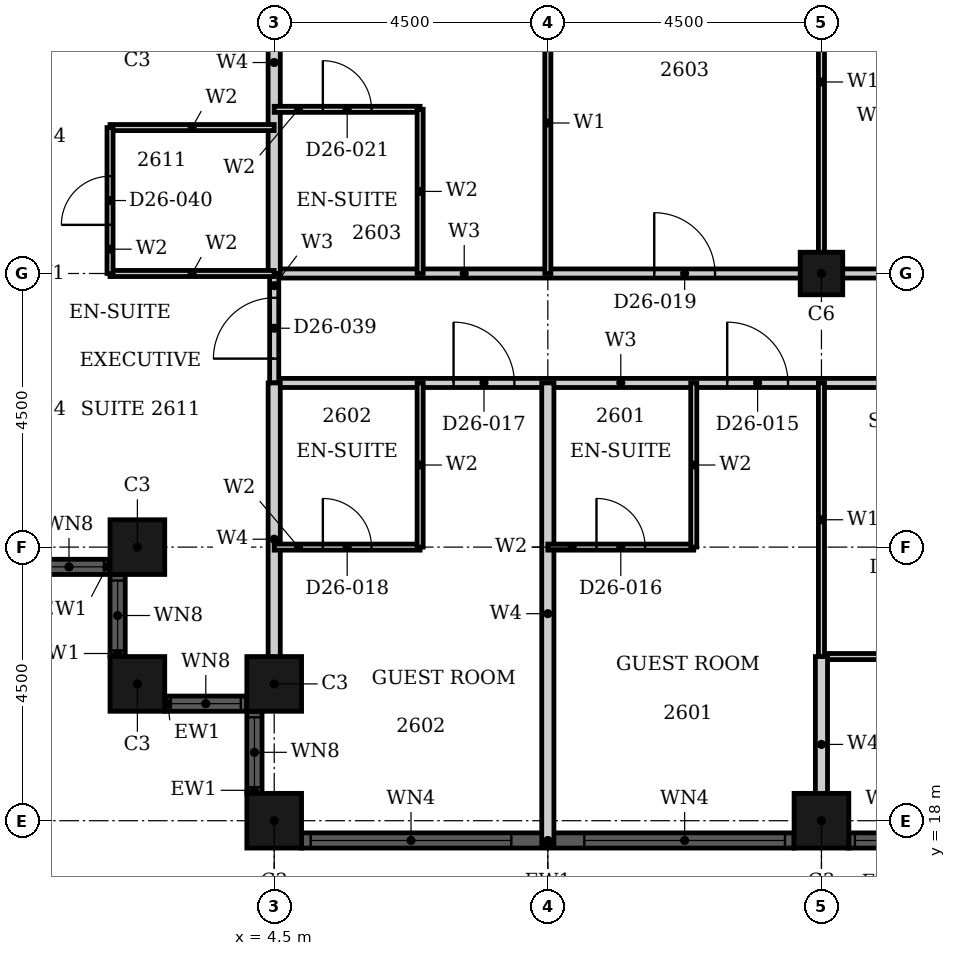
"""IFC4 building model, lengths in metres.
Left out: names, types, materials, properties, quantities, classifications, styles, units other than length and angle.
Written with IfcOpenShell. Run it as: python <this file> out.ifc"""

import sys

from ifc_helpers import new_model, si_unit, direction, frame, frame_2d, origin, origin_2d, place, context, subcontext, project, spatial, rectangle, hollow_rectangle, extrude, element, fill, save


model = new_model("IFC4")
c1 = context("Model", 3, precision=1e-05, world=origin(), true_north=direction((0.0, 1.0)))
c2 = subcontext(c1, "Body", "Model", "MODEL_VIEW")
j1 = project(units=[si_unit("LENGTHUNIT", "METRE"), si_unit("PLANEANGLEUNIT", "RADIAN")], contexts=[c1])
p1 = place(None, origin())
s1 = spatial("IfcSite", under=j1, at=p1, CompositionType="ELEMENT")
p2 = place(p1, origin())
s2 = spatial("IfcBuilding", under=s1, at=p2, CompositionType="ELEMENT")
p3 = place(p2, frame((0.0, 0.0, 108.0)))
s3 = spatial("IfcBuildingStorey", under=s2, at=p3, CompositionType="ELEMENT", Elevation=108.0)
for number, where, z_axis, x_axis in (
    (1, (2.25, 22.5, 0.0), (0.0, 0.0, 1.0), (1.0, 0.0, 0.0)),
    (2, (2.25, 20.25, 0.0), (0.0, 0.0, 1.0), (1.0, 0.0, 0.0)),
    (3, (4.5, 20.25, 0.0), (0.0, 0.0, 1.0), (1.0, 0.0, 0.0)),
    (4, (4.5, 18.0, 0.0), (0.0, 0.0, 1.0), (1.0, 0.0, 0.0)),
    (5, (13.5, 18.0, 0.0), (0.0, 0.0, 1.0), (1.0, 0.0, 0.0)),
):
    element("IfcColumn", number, at=place(p3, frame(where, z_axis=z_axis, x_axis=x_axis)), inside=s3, PredefinedType="COLUMN", context=c2, shape_type="SweptSolid", body=[
        extrude(hollow_rectangle(XDim=0.9, YDim=0.9, WallThickness=0.028, at=origin_2d()), origin(), (0.0, 0.0, 1.0), 3.6),
    ])
p4 = place(p3, frame((13.5, 27.0, 0.0), z_axis=(0.0, 0.0, 1.0), x_axis=(1.0, 0.0, 0.0)))
e6 = element("IfcColumn", 6, at=p4, inside=s3, PredefinedType="COLUMN", context=c2, shape_type="SweptSolid", body=[
    extrude(hollow_rectangle(XDim=0.7, YDim=0.7, WallThickness=0.022, at=origin_2d()), origin(), (0.0, 0.0, 1.0), 3.6),
])
p5 = place(p3, frame((0.45, 22.175, 0.0), z_axis=(0.0, 0.0, 1.0), x_axis=(1.0, 0.0, 0.0)))
e7 = element("IfcWall", 7, at=p5, inside=s3, PredefinedType="SOLIDWALL", context=c2, shape_type="SweptSolid", body=[
    extrude(rectangle(XDim=1.35, YDim=0.25, at=frame_2d((0.675, 0.0))), origin(), (0.0, 0.0, 1.0), 3.6),
])
p6 = place(p5, frame((0.1, 0.0, 0.9)))
e8 = element("IfcOpeningElement", 8, at=p6, cuts=e7, PredefinedType="OPENING", context=c2, shape_type="SweptSolid", body=[
    extrude(rectangle(XDim=1.15, YDim=2.08, at=frame_2d((0.575, 1.04))), frame((0.0, 0.135, 0.0), z_axis=(0.0, -1.0, 0.0), x_axis=(1.0, 0.0, 0.0)), (0.0, 0.0, 1.0), 0.27),
])
p7 = place(p3, frame((1.925, 22.05, 0.0), z_axis=(0.0, 0.0, 1.0), x_axis=(0.0, -1.0, 0.0)))
e9 = element("IfcWall", 9, at=p7, inside=s3, PredefinedType="SOLIDWALL", context=c2, shape_type="SweptSolid", body=[
    extrude(rectangle(XDim=1.35, YDim=0.25, at=frame_2d((0.675, 0.0))), origin(), (0.0, 0.0, 1.0), 3.6),
])
p8 = place(p7, frame((0.1, 0.0, 0.9)))
e10 = element("IfcOpeningElement", 10, at=p8, cuts=e9, PredefinedType="OPENING", context=c2, shape_type="SweptSolid", body=[
    extrude(rectangle(XDim=1.15, YDim=2.08, at=frame_2d((0.575, 1.04))), frame((0.0, 0.135, 0.0), z_axis=(0.0, -1.0, 0.0), x_axis=(1.0, 0.0, 0.0)), (0.0, 0.0, 1.0), 0.27),
])
p9 = place(p3, frame((2.7, 19.925, 0.0), z_axis=(0.0, 0.0, 1.0), x_axis=(1.0, 0.0, 0.0)))
e11 = element("IfcWall", 11, at=p9, inside=s3, PredefinedType="SOLIDWALL", context=c2, shape_type="SweptSolid", body=[
    extrude(rectangle(XDim=1.35, YDim=0.25, at=frame_2d((0.675, 0.0))), origin(), (0.0, 0.0, 1.0), 3.6),
])
p10 = place(p9, frame((0.1, 0.0, 0.9)))
e12 = element("IfcOpeningElement", 12, at=p10, cuts=e11, PredefinedType="OPENING", context=c2, shape_type="SweptSolid", body=[
    extrude(rectangle(XDim=1.15, YDim=2.08, at=frame_2d((0.575, 1.04))), frame((0.0, 0.135, 0.0), z_axis=(0.0, -1.0, 0.0), x_axis=(1.0, 0.0, 0.0)), (0.0, 0.0, 1.0), 0.27),
])
p11 = place(p3, frame((4.175, 19.8, 0.0), z_axis=(0.0, 0.0, 1.0), x_axis=(0.0, -1.0, 0.0)))
e13 = element("IfcWall", 13, at=p11, inside=s3, PredefinedType="SOLIDWALL", context=c2, shape_type="SweptSolid", body=[
    extrude(rectangle(XDim=1.35, YDim=0.25, at=frame_2d((0.675, 0.0))), origin(), (0.0, 0.0, 1.0), 3.6),
])
p12 = place(p11, frame((0.1, 0.0, 0.9)))
e14 = element("IfcOpeningElement", 14, at=p12, cuts=e13, PredefinedType="OPENING", context=c2, shape_type="SweptSolid", body=[
    extrude(rectangle(XDim=1.15, YDim=2.08, at=frame_2d((0.575, 1.04))), frame((0.0, 0.135, 0.0), z_axis=(0.0, -1.0, 0.0), x_axis=(1.0, 0.0, 0.0)), (0.0, 0.0, 1.0), 0.27),
])
p13 = place(p3, frame((4.95, 17.675, 0.0), z_axis=(0.0, 0.0, 1.0), x_axis=(1.0, 0.0, 0.0)))
e15 = element("IfcWall", 15, at=p13, inside=s3, PredefinedType="SOLIDWALL", context=c2, shape_type="SweptSolid", body=[
    extrude(rectangle(XDim=8.1, YDim=0.25, at=frame_2d((4.05, 0.0))), origin(), (0.0, 0.0, 1.0), 3.6),
])
p14 = place(p13, frame((0.15, 0.0, 0.9)))
e16 = element("IfcOpeningElement", 16, at=p14, cuts=e15, PredefinedType="OPENING", context=c2, shape_type="SweptSolid", body=[
    extrude(rectangle(XDim=3.3, YDim=2.08, at=frame_2d((1.65, 1.04))), frame((0.0, 0.135, 0.0), z_axis=(0.0, -1.0, 0.0), x_axis=(1.0, 0.0, 0.0)), (0.0, 0.0, 1.0), 0.27),
])
p15 = place(p13, frame((4.65, 0.0, 0.9)))
e17 = element("IfcOpeningElement", 17, at=p15, cuts=e15, PredefinedType="OPENING", context=c2, shape_type="SweptSolid", body=[
    extrude(rectangle(XDim=3.3, YDim=2.08, at=frame_2d((1.65, 1.04))), frame((0.0, 0.135, 0.0), z_axis=(0.0, -1.0, 0.0), x_axis=(1.0, 0.0, 0.0)), (0.0, 0.0, 1.0), 0.27),
])
p16 = place(p3, frame((13.95, 17.675, 0.0), z_axis=(0.0, 0.0, 1.0), x_axis=(1.0, 0.0, 0.0)))
e18 = element("IfcWall", 18, at=p16, inside=s3, PredefinedType="SOLIDWALL", context=c2, shape_type="SweptSolid", body=[
    extrude(rectangle(XDim=1.35, YDim=0.25, at=frame_2d((0.675, 0.0))), origin(), (0.0, 0.0, 1.0), 3.6),
])
p17 = place(p16, frame((0.1, 0.0, 0.9)))
e19 = element("IfcOpeningElement", 19, at=p17, cuts=e18, PredefinedType="OPENING", context=c2, shape_type="SweptSolid", body=[
    extrude(rectangle(XDim=1.15, YDim=2.08, at=frame_2d((0.575, 1.04))), frame((0.0, 0.135, 0.0), z_axis=(0.0, -1.0, 0.0), x_axis=(1.0, 0.0, 0.0)), (0.0, 0.0, 1.0), 0.27),
])
p18 = place(p3, frame((4.5, 25.2, 0.0), z_axis=(0.0, 0.0, 1.0), x_axis=(1.0, 0.0, 0.0)))
e20 = element("IfcWall", 20, at=p18, inside=s3, PredefinedType="PARTITIONING", context=c2, shape_type="SweptSolid", body=[
    extrude(rectangle(XDim=11.7, YDim=0.15, at=frame_2d((5.85, 0.0))), origin(), (0.0, 0.0, 1.0), 3.3),
])
p19 = place(p18, frame((7.45, 0.0, 0.0)))
e21 = element("IfcOpeningElement", 21, at=p19, cuts=e20, PredefinedType="OPENING", context=c2, shape_type="SweptSolid", body=[
    extrude(rectangle(XDim=1.0, YDim=2.1, at=frame_2d((0.5, 1.05))), frame((0.0, 0.085, 0.0), z_axis=(0.0, -1.0, 0.0), x_axis=(1.0, 0.0, 0.0)), (0.0, 0.0, 1.0), 0.17),
])
p20 = place(p18, frame((2.95, 0.0, 0.0)))
e22 = element("IfcOpeningElement", 22, at=p20, cuts=e20, PredefinedType="OPENING", context=c2, shape_type="SweptSolid", body=[
    extrude(rectangle(XDim=1.0, YDim=2.1, at=frame_2d((0.5, 1.05))), frame((0.0, 0.085, 0.0), z_axis=(0.0, -1.0, 0.0), x_axis=(1.0, 0.0, 0.0)), (0.0, 0.0, 1.0), 0.17),
])
p21 = place(p3, frame((4.5, 27.0, 0.0), z_axis=(0.0, 0.0, 1.0), x_axis=(1.0, 0.0, 0.0)))
e23 = element("IfcWall", 23, at=p21, inside=s3, PredefinedType="PARTITIONING", context=c2, shape_type="SweptSolid", body=[
    extrude(rectangle(XDim=11.7, YDim=0.15, at=frame_2d((5.85, 0.0))), origin(), (0.0, 0.0, 1.0), 2.58),
])
p22 = place(p21, frame((6.25, 0.0, 0.0)))
e24 = element("IfcOpeningElement", 24, at=p22, cuts=e23, PredefinedType="OPENING", context=c2, shape_type="SweptSolid", body=[
    extrude(rectangle(XDim=1.0, YDim=2.1, at=frame_2d((0.5, 1.05))), frame((0.0, 0.085, 0.0), z_axis=(0.0, -1.0, 0.0), x_axis=(1.0, 0.0, 0.0)), (0.0, 0.0, 1.0), 0.17),
])
p23 = place(p3, frame((4.5, 25.2, 0.0), z_axis=(0.0, 0.0, 1.0), x_axis=(0.0, 1.0, 0.0)))
e25 = element("IfcWall", 25, at=p23, inside=s3, PredefinedType="PARTITIONING", context=c2, shape_type="SweptSolid", body=[
    extrude(rectangle(XDim=1.8, YDim=0.15, at=frame_2d((0.9, 0.0))), origin(), (0.0, 0.0, 1.0), 3.3),
])
p24 = place(p23, frame((0.4, 0.0, 0.0)))
e26 = element("IfcOpeningElement", 26, at=p24, cuts=e25, PredefinedType="OPENING", context=c2, shape_type="SweptSolid", body=[
    extrude(rectangle(XDim=1.0, YDim=2.1, at=frame_2d((0.5, 1.05))), frame((0.0, 0.085, 0.0), z_axis=(0.0, -1.0, 0.0), x_axis=(1.0, 0.0, 0.0)), (0.0, 0.0, 1.0), 0.17),
])
p25 = place(p3, frame((13.5, 20.7, 0.0), z_axis=(0.0, 0.0, 1.0), x_axis=(1.0, 0.0, 0.0)))
e27 = element("IfcWall", 27, at=p25, inside=s3, PredefinedType="PARTITIONING", context=c2, shape_type="SweptSolid", body=[
    extrude(rectangle(XDim=2.7, YDim=0.1, at=frame_2d((1.35, 0.0))), origin(), (0.0, 0.0, 1.0), 3.3),
])
p26 = place(p3, frame((13.5, 20.7, 0.0), z_axis=(0.0, 0.0, 1.0), x_axis=(0.0, 1.0, 0.0)))
e28 = element("IfcWall", 28, at=p26, inside=s3, PredefinedType="PARTITIONING", context=c2, shape_type="SweptSolid", body=[
    extrude(rectangle(XDim=4.5, YDim=0.1, at=frame_2d((2.25, 0.0))), origin(), (0.0, 0.0, 1.0), 2.38),
])
p27 = place(p3, frame((13.5, 27.0, 0.0), z_axis=(0.0, 0.0, 1.0), x_axis=(0.0, 1.0, 0.0)))
e29 = element("IfcWall", 29, at=p27, inside=s3, PredefinedType="PARTITIONING", context=c2, shape_type="SweptSolid", body=[
    extrude(rectangle(XDim=6.3, YDim=0.1, at=frame_2d((3.15, 0.0))), origin(), (0.0, 0.0, 1.0), 2.38),
])
p28 = place(p3, frame((9.0, 27.0, 0.0), z_axis=(0.0, 0.0, 1.0), x_axis=(0.0, 1.0, 0.0)))
e30 = element("IfcWall", 30, at=p28, inside=s3, PredefinedType="PARTITIONING", context=c2, shape_type="SweptSolid", body=[
    extrude(rectangle(XDim=9.39, YDim=0.1, at=frame_2d((4.695, 0.0))), origin(), (0.0, 0.0, 1.0), 3.3),
])
p29 = place(p28, frame((4.95, 0.0, 0.0)))
e31 = element("IfcOpeningElement", 31, at=p29, cuts=e30, PredefinedType="OPENING", context=c2, shape_type="SweptSolid", body=[
    extrude(rectangle(XDim=0.9, YDim=2.1, at=frame_2d((0.45, 1.05))), frame((0.0, 0.06, 0.0), z_axis=(0.0, -1.0, 0.0), x_axis=(1.0, 0.0, 0.0)), (0.0, 0.0, 1.0), 0.12),
])
p30 = place(p3, frame((13.5, 17.81, 0.0), z_axis=(0.0, 0.0, 1.0), x_axis=(0.0, 1.0, 0.0)))
e32 = element("IfcWall", 32, at=p30, inside=s3, PredefinedType="PARTITIONING", context=c2, shape_type="SweptSolid", body=[
    extrude(rectangle(XDim=2.89, YDim=0.2, at=frame_2d((1.445, 0.0))), origin(), (0.0, 0.0, 1.0), 2.38),
])
p31 = place(p3, frame((4.5, 20.06, 0.0), z_axis=(0.0, 0.0, 1.0), x_axis=(0.0, 1.0, 0.0)))
e33 = element("IfcWall", 33, at=p31, inside=s3, PredefinedType="PARTITIONING", context=c2, shape_type="SweptSolid", body=[
    extrude(rectangle(XDim=5.14, YDim=0.2, at=frame_2d((2.57, 0.0))), origin(), (0.0, 0.0, 1.0), 3.3),
])
p32 = place(p3, frame((4.5, 27.0, 0.0), z_axis=(0.0, 0.0, 1.0), x_axis=(0.0, 1.0, 0.0)))
e34 = element("IfcWall", 34, at=p32, inside=s3, PredefinedType="PARTITIONING", context=c2, shape_type="SweptSolid", body=[
    extrude(rectangle(XDim=6.94, YDim=0.2, at=frame_2d((3.47, 0.0))), origin(), (0.0, 0.0, 1.0), 3.3),
])
p33 = place(p3, frame((9.0, 17.61, 0.0), z_axis=(0.0, 0.0, 1.0), x_axis=(0.0, 1.0, 0.0)))
e35 = element("IfcWall", 35, at=p33, inside=s3, PredefinedType="PARTITIONING", context=c2, shape_type="SweptSolid", body=[
    extrude(rectangle(XDim=7.59, YDim=0.2, at=frame_2d((3.795, 0.0))), origin(), (0.0, 0.0, 1.0), 3.3),
])
p34 = place(p3, frame((9.0, 22.5, 0.0), z_axis=(0.0, 0.0, 1.0), x_axis=(1.0, 0.0, 0.0)))
e36 = element("IfcWall", 36, at=p34, inside=s3, PredefinedType="PARTITIONING", context=c2, shape_type="SweptSolid", body=[
    extrude(rectangle(XDim=2.4, YDim=0.1, at=frame_2d((1.2, 0.0))), origin(), (0.0, 0.0, 1.0), 2.58),
])
p35 = place(p34, frame((0.8, 0.0, 0.0)))
e37 = element("IfcOpeningElement", 37, at=p35, cuts=e36, PredefinedType="OPENING", context=c2, shape_type="SweptSolid", body=[
    extrude(rectangle(XDim=0.8, YDim=2.1, at=frame_2d((0.4, 1.05))), frame((0.0, 0.06, 0.0), z_axis=(0.0, -1.0, 0.0), x_axis=(1.0, 0.0, 0.0)), (0.0, 0.0, 1.0), 0.12),
])
p36 = place(p3, frame((4.5, 22.5, 0.0), z_axis=(0.0, 0.0, 1.0), x_axis=(1.0, 0.0, 0.0)))
e38 = element("IfcWall", 38, at=p36, inside=s3, PredefinedType="PARTITIONING", context=c2, shape_type="SweptSolid", body=[
    extrude(rectangle(XDim=2.4, YDim=0.1, at=frame_2d((1.2, 0.0))), origin(), (0.0, 0.0, 1.0), 2.58),
])
p37 = place(p36, frame((0.8, 0.0, 0.0)))
e39 = element("IfcOpeningElement", 39, at=p37, cuts=e38, PredefinedType="OPENING", context=c2, shape_type="SweptSolid", body=[
    extrude(rectangle(XDim=0.8, YDim=2.1, at=frame_2d((0.4, 1.05))), frame((0.0, 0.06, 0.0), z_axis=(0.0, -1.0, 0.0), x_axis=(1.0, 0.0, 0.0)), (0.0, 0.0, 1.0), 0.12),
])
p38 = place(p3, frame((1.8, 27.0, 0.0), z_axis=(0.0, 0.0, 1.0), x_axis=(1.0, 0.0, 0.0)))
e40 = element("IfcWall", 40, at=p38, inside=s3, PredefinedType="PARTITIONING", context=c2, shape_type="SweptSolid", body=[
    extrude(rectangle(XDim=2.7, YDim=0.1, at=frame_2d((1.35, 0.0))), origin(), (0.0, 0.0, 1.0), 2.58),
])
p39 = place(p3, frame((1.8, 29.4, 0.0), z_axis=(0.0, 0.0, 1.0), x_axis=(1.0, 0.0, 0.0)))
e41 = element("IfcWall", 41, at=p39, inside=s3, PredefinedType="PARTITIONING", context=c2, shape_type="SweptSolid", body=[
    extrude(rectangle(XDim=2.7, YDim=0.1, at=frame_2d((1.35, 0.0))), origin(), (0.0, 0.0, 1.0), 3.3),
])
p40 = place(p3, frame((4.5, 29.7, 0.0), z_axis=(0.0, 0.0, 1.0), x_axis=(1.0, 0.0, 0.0)))
e42 = element("IfcWall", 42, at=p40, inside=s3, PredefinedType="PARTITIONING", context=c2, shape_type="SweptSolid", body=[
    extrude(rectangle(XDim=2.4, YDim=0.1, at=frame_2d((1.2, 0.0))), origin(), (0.0, 0.0, 1.0), 3.3),
])
p41 = place(p40, frame((0.8, 0.0, 0.0)))
e43 = element("IfcOpeningElement", 43, at=p41, cuts=e42, PredefinedType="OPENING", context=c2, shape_type="SweptSolid", body=[
    extrude(rectangle(XDim=0.8, YDim=2.1, at=frame_2d((0.4, 1.05))), frame((0.0, 0.06, 0.0), z_axis=(0.0, -1.0, 0.0), x_axis=(1.0, 0.0, 0.0)), (0.0, 0.0, 1.0), 0.12),
])
p42 = place(p3, frame((1.8, 27.0, 0.0), z_axis=(0.0, 0.0, 1.0), x_axis=(0.0, 1.0, 0.0)))
e44 = element("IfcWall", 44, at=p42, inside=s3, PredefinedType="PARTITIONING", context=c2, shape_type="SweptSolid", body=[
    extrude(rectangle(XDim=2.4, YDim=0.1, at=frame_2d((1.2, 0.0))), origin(), (0.0, 0.0, 1.0), 3.3),
])
p43 = place(p42, frame((0.8, 0.0, 0.0)))
e45 = element("IfcOpeningElement", 45, at=p43, cuts=e44, PredefinedType="OPENING", context=c2, shape_type="SweptSolid", body=[
    extrude(rectangle(XDim=0.8, YDim=2.1, at=frame_2d((0.4, 1.05))), frame((0.0, 0.06, 0.0), z_axis=(0.0, -1.0, 0.0), x_axis=(1.0, 0.0, 0.0)), (0.0, 0.0, 1.0), 0.12),
])
for number, where, z_axis, x_axis in (
    (46, (11.4, 22.5, 0.0), (0.0, 0.0, 1.0), (0.0, 1.0, 0.0)),
    (47, (6.9, 22.5, 0.0), (0.0, 0.0, 1.0), (0.0, 1.0, 0.0)),
    (48, (6.9, 27.0, 0.0), (0.0, 0.0, 1.0), (0.0, 1.0, 0.0)),
):
    element("IfcWall", number, at=place(p3, frame(where, z_axis=z_axis, x_axis=x_axis)), inside=s3, PredefinedType="PARTITIONING", context=c2, shape_type="SweptSolid", body=[
        extrude(rectangle(XDim=2.7, YDim=0.1, at=frame_2d((1.35, 0.0))), origin(), (0.0, 0.0, 1.0), 3.3),
    ])
p44 = place(p6, origin())
e49 = element("IfcWindow", 49, at=p44, inside=s3, PartitioningType="SINGLE_PANEL", PredefinedType="WINDOW", context=c2, shape_type="SweptSolid", body=[
    extrude(rectangle(XDim=1.15, YDim=2.08, at=frame_2d((0.575, 1.04))), frame((0.0, 0.03, 0.0), z_axis=(0.0, -1.0, 0.0), x_axis=(1.0, 0.0, 0.0)), (0.0, 0.0, 1.0), 0.06),
])
fill(e8, e49)
p45 = place(p8, origin())
e50 = element("IfcWindow", 50, at=p45, inside=s3, PartitioningType="SINGLE_PANEL", PredefinedType="WINDOW", context=c2, shape_type="SweptSolid", body=[
    extrude(rectangle(XDim=1.15, YDim=2.08, at=frame_2d((0.575, 1.04))), frame((0.0, 0.03, 0.0), z_axis=(0.0, -1.0, 0.0), x_axis=(1.0, 0.0, 0.0)), (0.0, 0.0, 1.0), 0.06),
])
fill(e10, e50)
p46 = place(p10, origin())
e51 = element("IfcWindow", 51, at=p46, inside=s3, PartitioningType="SINGLE_PANEL", PredefinedType="WINDOW", context=c2, shape_type="SweptSolid", body=[
    extrude(rectangle(XDim=1.15, YDim=2.08, at=frame_2d((0.575, 1.04))), frame((0.0, 0.03, 0.0), z_axis=(0.0, -1.0, 0.0), x_axis=(1.0, 0.0, 0.0)), (0.0, 0.0, 1.0), 0.06),
])
fill(e12, e51)
p47 = place(p12, origin())
e52 = element("IfcWindow", 52, at=p47, inside=s3, PartitioningType="SINGLE_PANEL", PredefinedType="WINDOW", context=c2, shape_type="SweptSolid", body=[
    extrude(rectangle(XDim=1.15, YDim=2.08, at=frame_2d((0.575, 1.04))), frame((0.0, 0.03, 0.0), z_axis=(0.0, -1.0, 0.0), x_axis=(1.0, 0.0, 0.0)), (0.0, 0.0, 1.0), 0.06),
])
fill(e14, e52)
p48 = place(p14, origin())
e53 = element("IfcWindow", 53, at=p48, inside=s3, PartitioningType="SINGLE_PANEL", PredefinedType="WINDOW", context=c2, shape_type="SweptSolid", body=[
    extrude(rectangle(XDim=3.3, YDim=2.08, at=frame_2d((1.65, 1.04))), frame((0.0, 0.03, 0.0), z_axis=(0.0, -1.0, 0.0), x_axis=(1.0, 0.0, 0.0)), (0.0, 0.0, 1.0), 0.06),
])
fill(e16, e53)
p49 = place(p15, origin())
e54 = element("IfcWindow", 54, at=p49, inside=s3, PartitioningType="SINGLE_PANEL", PredefinedType="WINDOW", context=c2, shape_type="SweptSolid", body=[
    extrude(rectangle(XDim=3.3, YDim=2.08, at=frame_2d((1.65, 1.04))), frame((0.0, 0.03, 0.0), z_axis=(0.0, -1.0, 0.0), x_axis=(1.0, 0.0, 0.0)), (0.0, 0.0, 1.0), 0.06),
])
fill(e17, e54)
p50 = place(p17, origin())
e55 = element("IfcWindow", 55, at=p50, inside=s3, PartitioningType="SINGLE_PANEL", PredefinedType="WINDOW", context=c2, shape_type="SweptSolid", body=[
    extrude(rectangle(XDim=1.15, YDim=2.08, at=frame_2d((0.575, 1.04))), frame((0.0, 0.03, 0.0), z_axis=(0.0, -1.0, 0.0), x_axis=(1.0, 0.0, 0.0)), (0.0, 0.0, 1.0), 0.06),
])
fill(e19, e55)
p51 = place(p19, origin())
e56 = element("IfcDoor", 56, at=p51, inside=s3, OperationType="SINGLE_SWING_RIGHT", PredefinedType="DOOR", context=c2, shape_type="SweptSolid", body=[
    extrude(rectangle(XDim=1.0, YDim=2.1, at=frame_2d((0.5, 1.05))), frame((0.0, 0.025, 0.0), z_axis=(0.0, -1.0, 0.0), x_axis=(1.0, 0.0, 0.0)), (0.0, 0.0, 1.0), 0.05),
])
fill(e21, e56)
p52 = place(p35, origin())
e57 = element("IfcDoor", 57, at=p52, inside=s3, OperationType="SINGLE_SWING_RIGHT", PredefinedType="DOOR", context=c2, shape_type="SweptSolid", body=[
    extrude(rectangle(XDim=0.8, YDim=2.1, at=frame_2d((0.4, 1.05))), frame((0.0, 0.025, 0.0), z_axis=(0.0, -1.0, 0.0), x_axis=(1.0, 0.0, 0.0)), (0.0, 0.0, 1.0), 0.05),
])
fill(e37, e57)
p53 = place(p20, origin())
e58 = element("IfcDoor", 58, at=p53, inside=s3, OperationType="SINGLE_SWING_RIGHT", PredefinedType="DOOR", context=c2, shape_type="SweptSolid", body=[
    extrude(rectangle(XDim=1.0, YDim=2.1, at=frame_2d((0.5, 1.05))), frame((0.0, 0.025, 0.0), z_axis=(0.0, -1.0, 0.0), x_axis=(1.0, 0.0, 0.0)), (0.0, 0.0, 1.0), 0.05),
])
fill(e22, e58)
p54 = place(p37, origin())
e59 = element("IfcDoor", 59, at=p54, inside=s3, OperationType="SINGLE_SWING_LEFT", PredefinedType="DOOR", context=c2, shape_type="SweptSolid", body=[
    extrude(rectangle(XDim=0.8, YDim=2.1, at=frame_2d((0.4, 1.05))), frame((0.0, 0.025, 0.0), z_axis=(0.0, -1.0, 0.0), x_axis=(1.0, 0.0, 0.0)), (0.0, 0.0, 1.0), 0.05),
])
fill(e39, e59)
p55 = place(p22, origin())
e60 = element("IfcDoor", 60, at=p55, inside=s3, OperationType="SINGLE_SWING_RIGHT", PredefinedType="DOOR", context=c2, shape_type="SweptSolid", body=[
    extrude(rectangle(XDim=1.0, YDim=2.1, at=frame_2d((0.5, 1.05))), frame((0.0, 0.025, 0.0), z_axis=(0.0, -1.0, 0.0), x_axis=(1.0, 0.0, 0.0)), (0.0, 0.0, 1.0), 0.05),
])
fill(e24, e60)
p56 = place(p41, origin())
e61 = element("IfcDoor", 61, at=p56, inside=s3, OperationType="SINGLE_SWING_RIGHT", PredefinedType="DOOR", context=c2, shape_type="SweptSolid", body=[
    extrude(rectangle(XDim=0.8, YDim=2.1, at=frame_2d((0.4, 1.05))), frame((0.0, 0.025, 0.0), z_axis=(0.0, -1.0, 0.0), x_axis=(1.0, 0.0, 0.0)), (0.0, 0.0, 1.0), 0.05),
])
fill(e43, e61)
p57 = place(p24, origin())
e62 = element("IfcDoor", 62, at=p57, inside=s3, OperationType="SINGLE_SWING_LEFT", PredefinedType="DOOR", context=c2, shape_type="SweptSolid", body=[
    extrude(rectangle(XDim=1.0, YDim=2.1, at=frame_2d((0.5, 1.05))), frame((0.0, 0.025, 0.0), z_axis=(0.0, -1.0, 0.0), x_axis=(1.0, 0.0, 0.0)), (0.0, 0.0, 1.0), 0.05),
])
fill(e26, e62)
p58 = place(p43, origin())
e63 = element("IfcDoor", 63, at=p58, inside=s3, OperationType="SINGLE_SWING_RIGHT", PredefinedType="DOOR", context=c2, shape_type="SweptSolid", body=[
    extrude(rectangle(XDim=0.8, YDim=2.1, at=frame_2d((0.4, 1.05))), frame((0.0, 0.025, 0.0), z_axis=(0.0, -1.0, 0.0), x_axis=(1.0, 0.0, 0.0)), (0.0, 0.0, 1.0), 0.05),
])
fill(e45, e63)
save(model, sys.argv[1])
